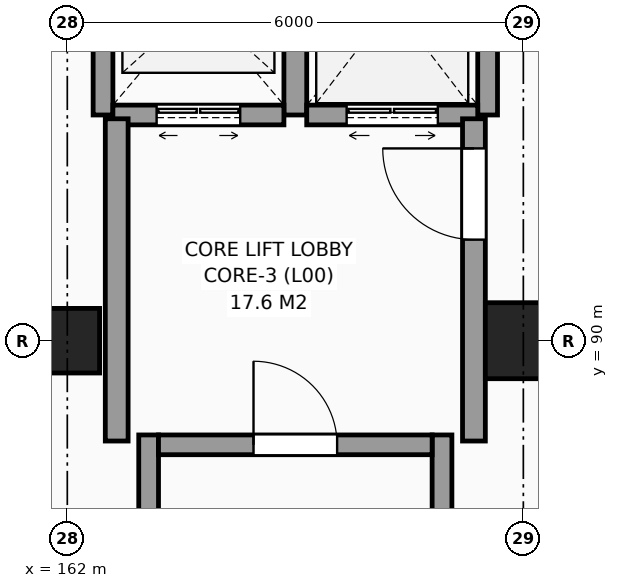
"""IFC4 building model, lengths in metres.
Left out: names, types, materials, properties, quantities, classifications, styles, units other than length and angle.
Written with IfcOpenShell. Run it as: python <this file> out.ifc"""

import sys

from ifc_helpers import new_model, si_unit, direction, frame, frame_2d, origin, origin_2d, place, context, subcontext, project, spatial, rectangle, circle, extrude, element, fill, save


model = new_model("IFC4")
c1 = context("Model", 3, precision=1e-05, world=origin(), true_north=direction((0.0, 1.0)))
c2 = subcontext(c1, "Body", "Model", "MODEL_VIEW")
j1 = project(units=[si_unit("LENGTHUNIT", "METRE"), si_unit("PLANEANGLEUNIT", "RADIAN")], contexts=[c1])
p1 = place(None, origin())
s1 = spatial("IfcSite", under=j1, at=p1, CompositionType="ELEMENT")
p2 = place(p1, origin())
s2 = spatial("IfcBuilding", under=s1, at=p2, CompositionType="ELEMENT")
p3 = place(p2, origin())
s3 = spatial("IfcBuildingStorey", under=s2, at=p3, CompositionType="ELEMENT", Elevation=0.0)
p4 = place(p3, frame((162.0, 90.0, 0.0), z_axis=(0.0, 0.0, 1.0), x_axis=(1.0, 0.0, 0.0)))
e1 = element("IfcColumn", 1, at=p4, inside=s3, PredefinedType="COLUMN", context=c2, shape_type="SweptSolid", body=[
    extrude(circle(Radius=0.425, at=origin_2d()), origin(), (0.0, 0.0, 1.0), 6.0),
])
p5 = place(p3, frame((168.0, 90.0, 0.0), z_axis=(0.0, 0.0, 1.0), x_axis=(1.0, 0.0, 0.0)))
e2 = element("IfcColumn", 2, at=p5, inside=s3, PredefinedType="COLUMN", context=c2, shape_type="SweptSolid", body=[
    extrude(circle(Radius=0.5, at=origin_2d()), origin(), (0.0, 0.0, 1.0), 6.0),
])
for number, where, z_axis, x_axis in (
    (3, (163.07, 78.04, 0.0), (0.0, 0.0, 1.0), (0.0, 1.0, 0.0)),
    (4, (166.93, 78.04, 0.0), (0.0, 0.0, 1.0), (0.0, 1.0, 0.0)),
):
    element("IfcWall", number, at=place(p3, frame(where, z_axis=z_axis, x_axis=x_axis)), inside=s3, PredefinedType="SHEAR", context=c2, shape_type="SweptSolid", body=[
        extrude(rectangle(XDim=10.72, YDim=0.26, at=frame_2d((5.36, 0.0))), origin(), (0.0, 0.0, 1.0), 6.0),
    ])
p6 = place(p3, frame((163.2, 88.63, 0.0), z_axis=(0.0, 0.0, 1.0), x_axis=(1.0, 0.0, 0.0)))
e5 = element("IfcWall", 5, at=p6, inside=s3, PredefinedType="SHEAR", context=c2, shape_type="SweptSolid", body=[
    extrude(rectangle(XDim=3.6, YDim=0.26, at=frame_2d((1.8, 0.0))), origin(), (0.0, 0.0, 1.0), 6.0),
])
p7 = place(p6, frame((1.25, 0.0, 0.0)))
e6 = element("IfcOpeningElement", 6, at=p7, cuts=e5, PredefinedType="OPENING", context=c2, shape_type="SweptSolid", body=[
    extrude(rectangle(XDim=1.1, YDim=2.15, at=frame_2d((0.55, 1.075))), frame((0.0, 0.14, 0.0), z_axis=(0.0, -1.0, 0.0), x_axis=(1.0, 0.0, 0.0)), (0.0, 0.0, 1.0), 0.28),
])
p8 = place(p3, frame((162.47, 92.97, 0.0), z_axis=(0.0, 0.0, 1.0), x_axis=(0.0, 1.0, 0.0)))
e7 = element("IfcWall", 7, at=p8, inside=s3, PredefinedType="SHEAR", context=c2, shape_type="SweptSolid", body=[
    extrude(rectangle(XDim=2.91, YDim=0.26, at=frame_2d((1.455, 0.0))), origin(), (0.0, 0.0, 1.0), 6.0),
])
p9 = place(p3, frame((165.0, 92.97, 0.0), z_axis=(0.0, 0.0, 1.0), x_axis=(0.0, 1.0, 0.0)))
e8 = element("IfcWall", 8, at=p9, inside=s3, PredefinedType="SHEAR", context=c2, shape_type="SweptSolid", body=[
    extrude(rectangle(XDim=2.91, YDim=0.3, at=frame_2d((1.455, 0.0))), origin(), (0.0, 0.0, 1.0), 6.0),
])
p10 = place(p3, frame((162.6, 92.97, 0.0), z_axis=(0.0, 0.0, 1.0), x_axis=(1.0, 0.0, 0.0)))
e9 = element("IfcWall", 9, at=p10, inside=s3, PredefinedType="SHEAR", context=c2, shape_type="SweptSolid", body=[
    extrude(rectangle(XDim=2.25, YDim=0.26, at=frame_2d((1.125, 0.0))), origin(), (0.0, 0.0, 1.0), 6.0),
])
p11 = place(p10, frame((0.575, 0.0, 0.0)))
e10 = element("IfcOpeningElement", 10, at=p11, cuts=e9, PredefinedType="OPENING", context=c2, shape_type="SweptSolid", body=[
    extrude(rectangle(XDim=1.1, YDim=2.2, at=frame_2d((0.55, 1.1))), frame((0.0, 0.14, 0.0), z_axis=(0.0, -1.0, 0.0), x_axis=(1.0, 0.0, 0.0)), (0.0, 0.0, 1.0), 0.28),
])
p12 = place(p3, frame((167.53, 92.97, 0.0), z_axis=(0.0, 0.0, 1.0), x_axis=(0.0, 1.0, 0.0)))
e11 = element("IfcWall", 11, at=p12, inside=s3, PredefinedType="SHEAR", context=c2, shape_type="SweptSolid", body=[
    extrude(rectangle(XDim=2.91, YDim=0.26, at=frame_2d((1.455, 0.0))), origin(), (0.0, 0.0, 1.0), 6.0),
])
p13 = place(p3, frame((165.15, 92.97, 0.0), z_axis=(0.0, 0.0, 1.0), x_axis=(1.0, 0.0, 0.0)))
e12 = element("IfcWall", 12, at=p13, inside=s3, PredefinedType="SHEAR", context=c2, shape_type="SweptSolid", body=[
    extrude(rectangle(XDim=2.25, YDim=0.26, at=frame_2d((1.125, 0.0))), origin(), (0.0, 0.0, 1.0), 6.0),
])
p14 = place(p13, frame((0.525, 0.0, 0.0)))
e13 = element("IfcOpeningElement", 13, at=p14, cuts=e12, PredefinedType="OPENING", context=c2, shape_type="SweptSolid", body=[
    extrude(rectangle(XDim=1.2, YDim=2.25, at=frame_2d((0.6, 1.125))), frame((0.0, 0.14, 0.0), z_axis=(0.0, -1.0, 0.0), x_axis=(1.0, 0.0, 0.0)), (0.0, 0.0, 1.0), 0.28),
])
p15 = place(p3, frame((167.35, 88.68, 0.0), z_axis=(0.0, 0.0, 1.0), x_axis=(0.0, 1.0, 0.0)))
e14 = element("IfcWall", 14, at=p15, inside=s3, PredefinedType="SHEAR", context=c2, shape_type="SweptSolid", body=[
    extrude(rectangle(XDim=4.24, YDim=0.3, at=frame_2d((2.12, 0.0))), origin(), (0.0, 0.0, 1.0), 6.0),
])
p16 = place(p15, frame((2.65, 0.0, 0.0)))
e15 = element("IfcOpeningElement", 15, at=p16, cuts=e14, PredefinedType="OPENING", context=c2, shape_type="SweptSolid", body=[
    extrude(rectangle(XDim=1.2, YDim=2.2, at=frame_2d((0.6, 1.1))), frame((0.0, 0.16, 0.0), z_axis=(0.0, -1.0, 0.0), x_axis=(1.0, 0.0, 0.0)), (0.0, 0.0, 1.0), 0.32),
])
p17 = place(p3, frame((162.65, 88.68, 0.0), z_axis=(0.0, 0.0, 1.0), x_axis=(0.0, 1.0, 0.0)))
e16 = element("IfcWall", 16, at=p17, inside=s3, PredefinedType="SHEAR", context=c2, shape_type="SweptSolid", body=[
    extrude(rectangle(XDim=4.24, YDim=0.3, at=frame_2d((2.12, 0.0))), origin(), (0.0, 0.0, 1.0), 6.0),
])
p18 = place(p7, origin())
e17 = element("IfcDoor", 17, at=p18, inside=s3, OperationType="SINGLE_SWING_LEFT", PredefinedType="DOOR", context=c2, shape_type="SweptSolid", body=[
    extrude(rectangle(XDim=1.1, YDim=2.15, at=frame_2d((0.55, 1.075))), frame((0.0, 0.025, 0.0), z_axis=(0.0, -1.0, 0.0), x_axis=(1.0, 0.0, 0.0)), (0.0, 0.0, 1.0), 0.05),
])
fill(e6, e17)
p19 = place(p11, origin())
e18 = element("IfcDoor", 18, at=p19, inside=s3, OperationType="DOUBLE_DOOR_SLIDING", PredefinedType="DOOR", context=c2, shape_type="SweptSolid", body=[
    extrude(rectangle(XDim=1.1, YDim=2.2, at=frame_2d((0.55, 1.1))), frame((0.0, 0.025, 0.0), z_axis=(0.0, -1.0, 0.0), x_axis=(1.0, 0.0, 0.0)), (0.0, 0.0, 1.0), 0.05),
])
fill(e10, e18)
p20 = place(p14, origin())
e19 = element("IfcDoor", 19, at=p20, inside=s3, OperationType="DOUBLE_DOOR_SLIDING", PredefinedType="DOOR", context=c2, shape_type="SweptSolid", body=[
    extrude(rectangle(XDim=1.2, YDim=2.25, at=frame_2d((0.6, 1.125))), frame((0.0, 0.025, 0.0), z_axis=(0.0, -1.0, 0.0), x_axis=(1.0, 0.0, 0.0)), (0.0, 0.0, 1.0), 0.05),
])
fill(e13, e19)
p21 = place(p16, origin())
e20 = element("IfcDoor", 20, at=p21, inside=s3, OperationType="SINGLE_SWING_RIGHT", PredefinedType="DOOR", context=c2, shape_type="SweptSolid", body=[
    extrude(rectangle(XDim=1.2, YDim=2.2, at=frame_2d((0.6, 1.1))), frame((0.0, 0.025, 0.0), z_axis=(0.0, -1.0, 0.0), x_axis=(1.0, 0.0, 0.0)), (0.0, 0.0, 1.0), 0.05),
])
fill(e15, e20)
save(model, sys.argv[1])
